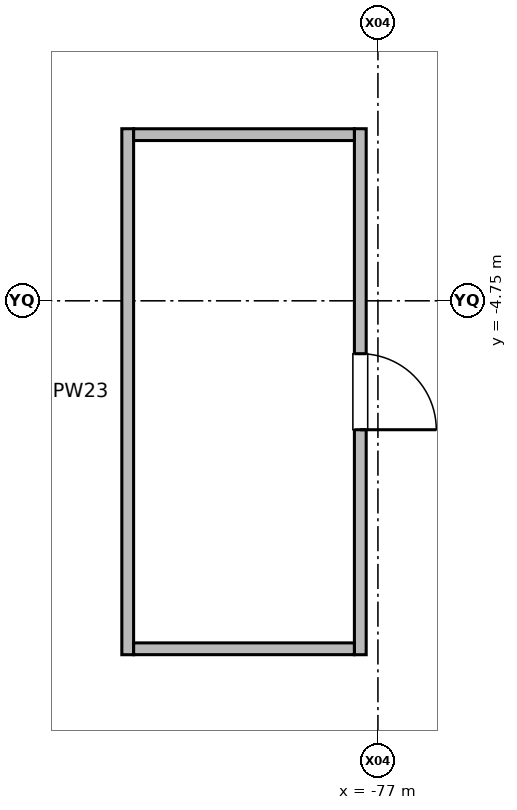
"""IFC4 building model, lengths in metres.
Left out: names, types, materials, properties, quantities, classifications, styles, units other than length and angle.
Written with IfcOpenShell. Run it as: python <this file> out.ifc"""

import sys

from ifc_helpers import new_model, si_unit, direction, frame, frame_2d, origin, place, context, subcontext, project, spatial, rectangle, extrude, element, fill, save


model = new_model("IFC4")
c1 = context("Model", 3, precision=1e-05, world=origin(), true_north=direction((0.0, 1.0)))
c2 = subcontext(c1, "Body", "Model", "MODEL_VIEW")
j1 = project(units=[si_unit("LENGTHUNIT", "METRE"), si_unit("PLANEANGLEUNIT", "RADIAN")], contexts=[c1])
p1 = place(None, origin())
s1 = spatial("IfcSite", under=j1, at=p1, CompositionType="ELEMENT")
p2 = place(p1, origin())
s2 = spatial("IfcBuilding", under=s1, at=p2, CompositionType="ELEMENT")
p3 = place(p2, frame((0.0, 0.0, 16.2)))
s3 = spatial("IfcBuildingStorey", under=s2, at=p3, CompositionType="ELEMENT", Elevation=16.2)
p4 = place(p3, frame((-77.232, -2.486, 0.0), z_axis=(0.0, 0.0, 1.0), x_axis=(0.0, -1.0, 0.0)))
e1 = element("IfcWall", 1, at=p4, inside=s3, PredefinedType="PARTITIONING", context=c2, shape_type="SweptSolid", body=[
    extrude(rectangle(XDim=6.92, YDim=0.155, at=frame_2d((3.46, 0.0))), origin(), (0.0, 0.0, 1.0), 3.82),
])
p5 = place(p4, frame((2.96, 0.0, 0.0)))
e2 = element("IfcOpeningElement", 2, at=p5, cuts=e1, PredefinedType="OPENING", context=c2, shape_type="SweptSolid", body=[
    extrude(rectangle(XDim=1.0, YDim=2.15, at=frame_2d((0.5, 1.075))), frame((0.0, 0.087, 0.0), z_axis=(0.0, -1.0, 0.0), x_axis=(1.0, 0.0, 0.0)), (0.0, 0.0, 1.0), 0.175),
])
p6 = place(p3, frame((-80.292, -9.406, 0.0), z_axis=(0.0, 0.0, 1.0), x_axis=(0.0, 1.0, 0.0)))
e3 = element("IfcWall", 3, at=p6, inside=s3, PredefinedType="PARTITIONING", context=c2, shape_type="SweptSolid", body=[
    extrude(rectangle(XDim=6.92, YDim=0.155, at=frame_2d((3.46, 0.0))), origin(), (0.0, 0.0, 1.0), 3.82),
])
for number, where, z_axis, x_axis in (
    (4, (-80.214, -9.328, 0.0), (0.0, 0.0, 1.0), (1.0, 0.0, 0.0)),
    (5, (-80.214, -2.564, 0.0), (0.0, 0.0, 1.0), (1.0, 0.0, 0.0)),
):
    element("IfcWall", number, at=place(p3, frame(where, z_axis=z_axis, x_axis=x_axis)), inside=s3, PredefinedType="PARTITIONING", context=c2, shape_type="SweptSolid", body=[
        extrude(rectangle(XDim=2.904, YDim=0.155, at=frame_2d((1.452, 0.0))), origin(), (0.0, 0.0, 1.0), 3.82),
    ])
p7 = place(p5, origin())
e6 = element("IfcDoor", 6, at=p7, inside=s3, OperationType="SINGLE_SWING_RIGHT", PredefinedType="DOOR", context=c2, shape_type="SweptSolid", body=[
    extrude(rectangle(XDim=1.0, YDim=2.15, at=frame_2d((0.5, 1.075))), frame((0.0, 0.025, 0.0), z_axis=(0.0, -1.0, 0.0), x_axis=(1.0, 0.0, 0.0)), (0.0, 0.0, 1.0), 0.05),
])
fill(e2, e6)
save(model, sys.argv[1])
